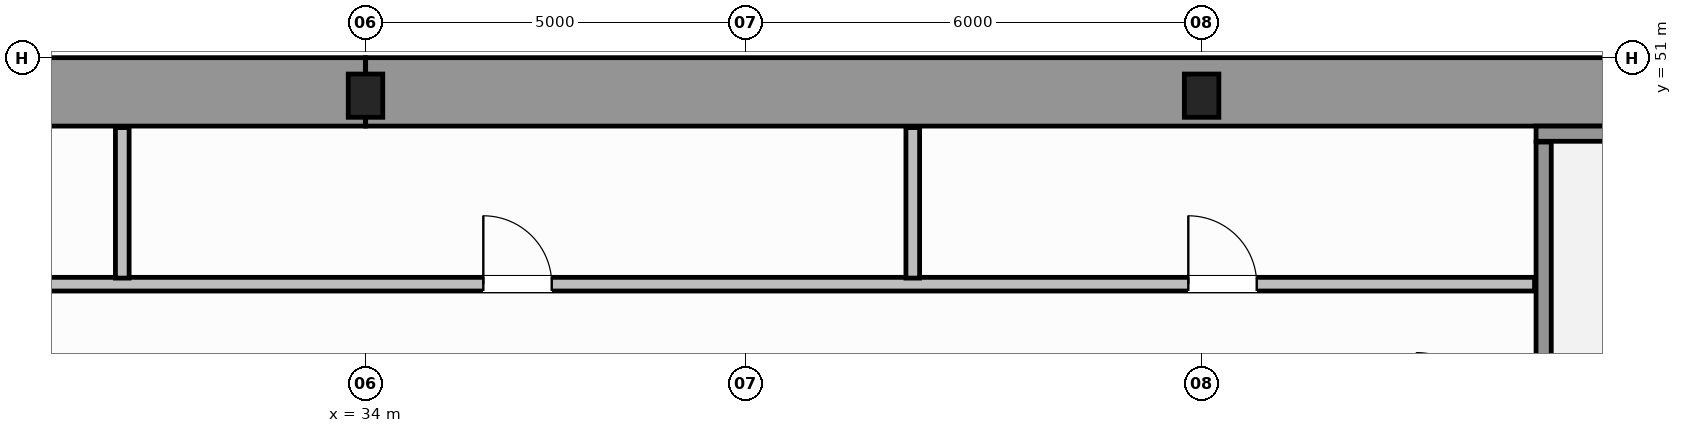
"""IFC4 building model, lengths in metres.
Left out: names, types, materials, properties, quantities, classifications, styles, units other than length and angle.
Written with IfcOpenShell. Run it as: python <this file> out.ifc"""

import sys

from ifc_helpers import new_model, si_unit, direction, frame, frame_2d, origin, origin_2d, place, context, subcontext, project, spatial, rectangle, i_section, extrude, source, transform, mapped, element, fill, save


model = new_model("IFC4")
c1 = context("Model", 3, precision=1e-05, world=origin(), true_north=direction((0.0, 1.0)))
c2 = subcontext(c1, "Body", "Model", "MODEL_VIEW")
j1 = project(units=[si_unit("LENGTHUNIT", "METRE"), si_unit("PLANEANGLEUNIT", "RADIAN")], contexts=[c1])
p1 = place(None, origin())
s1 = spatial("IfcSite", under=j1, at=p1, CompositionType="ELEMENT")
p2 = place(p1, origin())
s2 = spatial("IfcBuilding", under=s1, at=p2, CompositionType="ELEMENT")
p3 = place(p2, frame((0.0, 0.0, 5.6)))
s3 = spatial("IfcBuildingStorey", under=s2, at=p3, CompositionType="ELEMENT", Elevation=5.6)
m1 = source(origin(), c2, "Body", "SweptSolid", [
    extrude(i_section(OverallWidth=0.454, OverallDepth=0.569, WebThickness=0.078, FlangeThickness=0.08, FilletRadius=0.015, at=origin_2d()), origin(), (0.0, 0.0, 1.0), 4.4),
])
for number, where, z_axis, x_axis in (
    (1, (34.0, 50.5, 0.0), (0.0, 0.0, 1.0), (1.0, 0.0, 0.0)),
    (2, (45.0, 50.5, 0.0), (0.0, 0.0, 1.0), (1.0, 0.0, 0.0)),
):
    element("IfcColumn", number, at=place(p3, frame(where, z_axis=z_axis, x_axis=x_axis)), inside=s3, PredefinedType="COLUMN", context=c2, shape_type="MappedRepresentation", body=[
        mapped(m1, transform((0.0, 0.0, 0.0), scale=1.0)),
    ])
for number, where, z_axis, x_axis in (
    (3, (14.454, 50.55, 0.0), (0.0, 0.0, 1.0), (1.0, 0.0, 0.0)),
    (4, (34.002, 50.55, 0.0), (0.0, 0.0, 1.0), (1.0, 0.0, 0.0)),
):
    element("IfcWall", number, at=place(p3, frame(where, z_axis=z_axis, x_axis=x_axis)), inside=s3, PredefinedType="SHEAR", context=c2, shape_type="SweptSolid", body=[
        extrude(rectangle(XDim=19.544, YDim=0.9, at=frame_2d((9.772, 0.0))), origin(), (0.0, 0.0, 1.0), 4.4),
    ])
p4 = place(p3, frame((49.4, 50.0, 0.0), z_axis=(0.0, 0.0, 1.0), x_axis=(1.0, 0.0, 0.0)))
e5 = element("IfcWall", 5, at=p4, inside=s3, PredefinedType="SOLIDWALL", context=c2, shape_type="SweptSolid", body=[
    extrude(rectangle(XDim=4.15, YDim=0.2, at=frame_2d((2.075, 0.0))), origin(), (0.0, 0.0, 1.0), 4.4),
])
p5 = place(p3, frame((49.5, 39.96, 0.0), z_axis=(0.0, 0.0, 1.0), x_axis=(0.0, 1.0, 0.0)))
e6 = element("IfcWall", 6, at=p5, inside=s3, PredefinedType="SOLIDWALL", context=c2, shape_type="SweptSolid", body=[
    extrude(rectangle(XDim=9.93, YDim=0.2, at=frame_2d((4.965, 0.0))), origin(), (0.0, 0.0, 1.0), 4.4),
])
p6 = place(p3, frame((18.62, 48.02, 0.0), z_axis=(0.0, 0.0, 1.0), x_axis=(1.0, 0.0, 0.0)))
e7 = element("IfcWall", 7, at=p6, inside=s3, PredefinedType="PLUMBINGWALL", context=c2, shape_type="SweptSolid", body=[
    extrude(rectangle(XDim=30.76, YDim=0.18, at=frame_2d((15.38, 0.0))), origin(), (0.0, 0.0, 1.0), 4.12),
])
p7 = place(p6, frame((1.955, 0.0, 0.0)))
e8 = element("IfcOpeningElement", 8, at=p7, cuts=e7, PredefinedType="OPENING", context=c2, shape_type="SweptSolid", body=[
    extrude(rectangle(XDim=0.9, YDim=2.15, at=frame_2d((0.45, 1.075))), frame((0.0, 0.1, 0.0), z_axis=(0.0, -1.0, 0.0), x_axis=(1.0, 0.0, 0.0)), (0.0, 0.0, 1.0), 0.2),
])
p8 = place(p6, frame((8.03, 0.0, 0.0)))
e9 = element("IfcOpeningElement", 9, at=p8, cuts=e7, PredefinedType="OPENING", context=c2, shape_type="SweptSolid", body=[
    extrude(rectangle(XDim=0.9, YDim=2.15, at=frame_2d((0.45, 1.075))), frame((0.0, 0.1, 0.0), z_axis=(0.0, -1.0, 0.0), x_axis=(1.0, 0.0, 0.0)), (0.0, 0.0, 1.0), 0.2),
])
p9 = place(p6, frame((16.93, 0.0, 0.0)))
e10 = element("IfcOpeningElement", 10, at=p9, cuts=e7, PredefinedType="OPENING", context=c2, shape_type="SweptSolid", body=[
    extrude(rectangle(XDim=0.9, YDim=2.15, at=frame_2d((0.45, 1.075))), frame((0.0, 0.1, 0.0), z_axis=(0.0, -1.0, 0.0), x_axis=(1.0, 0.0, 0.0)), (0.0, 0.0, 1.0), 0.2),
])
p10 = place(p6, frame((26.205, 0.0, 0.0)))
e11 = element("IfcOpeningElement", 11, at=p10, cuts=e7, PredefinedType="OPENING", context=c2, shape_type="SweptSolid", body=[
    extrude(rectangle(XDim=0.9, YDim=2.15, at=frame_2d((0.45, 1.075))), frame((0.0, 0.1, 0.0), z_axis=(0.0, -1.0, 0.0), x_axis=(1.0, 0.0, 0.0)), (0.0, 0.0, 1.0), 0.2),
])
for number, where, z_axis, x_axis in (
    (12, (30.8, 48.1, 0.0), (0.0, 0.0, 1.0), (0.0, 1.0, 0.0)),
    (13, (41.2, 48.1, 0.0), (0.0, 0.0, 1.0), (0.0, 1.0, 0.0)),
):
    element("IfcWall", number, at=place(p3, frame(where, z_axis=z_axis, x_axis=x_axis)), inside=s3, PredefinedType="PLUMBINGWALL", context=c2, shape_type="SweptSolid", body=[
        extrude(rectangle(XDim=1.98, YDim=0.18, at=frame_2d((0.99, 0.0))), origin(), (0.0, 0.0, 1.0), 4.12),
    ])
m2 = source(origin(), c2, "Body", "SweptSolid", [
    extrude(rectangle(XDim=0.9, YDim=2.15, at=frame_2d((0.45, 1.075))), frame((0.0, 0.025, 0.0), z_axis=(0.0, -1.0, 0.0), x_axis=(1.0, 0.0, 0.0)), (0.0, 0.0, 1.0), 0.05),
])
p11 = place(p9, origin())
e14 = element("IfcDoor", 14, at=p11, inside=s3, OperationType="SINGLE_SWING_LEFT", PredefinedType="DOOR", context=c2, shape_type="MappedRepresentation", body=[
    mapped(m2, transform((0.0, 0.0, 0.0), scale=1.0)),
])
fill(e10, e14)
p12 = place(p10, origin())
e15 = element("IfcDoor", 15, at=p12, inside=s3, OperationType="SINGLE_SWING_RIGHT", PredefinedType="DOOR", context=c2, shape_type="MappedRepresentation", body=[
    mapped(m2, transform((0.0, 0.0, 0.0), scale=1.0)),
])
fill(e11, e15)
save(model, sys.argv[1])
